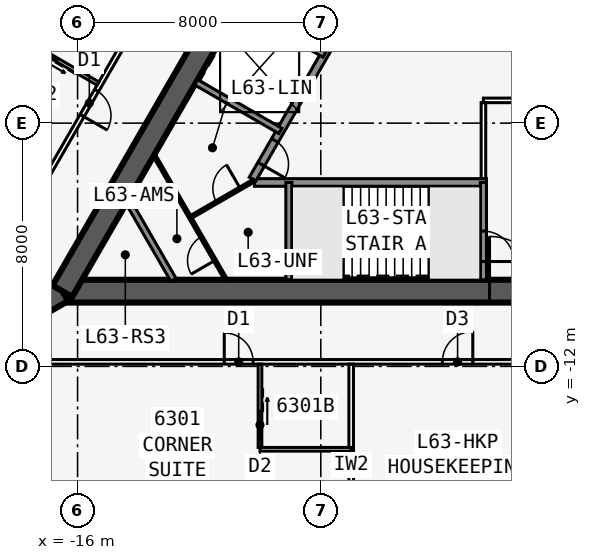
"""IFC4 building model, lengths in metres.
Left out: names, types, materials, properties, quantities, classifications, styles, units other than length and angle.
Written with IfcOpenShell. Run it as: python <this file> out.ifc"""

import sys

from ifc_helpers import new_model, si_unit, direction, frame, frame_2d, origin, place, context, subcontext, project, spatial, rectangle, extrude, element, fill, save


model = new_model("IFC4")
c1 = context("Model", 3, precision=1e-05, world=origin(), true_north=direction((0.0, 1.0)))
c2 = subcontext(c1, "Body", "Model", "MODEL_VIEW")
j1 = project(units=[si_unit("LENGTHUNIT", "METRE"), si_unit("PLANEANGLEUNIT", "RADIAN")], contexts=[c1])
p1 = place(None, origin())
s1 = spatial("IfcSite", under=j1, at=p1, CompositionType="ELEMENT")
p2 = place(p1, origin())
s2 = spatial("IfcBuilding", under=s1, at=p2, CompositionType="ELEMENT")
p3 = place(p2, frame((0.0, 0.0, 239.3)))
s3 = spatial("IfcBuildingStorey", under=s2, at=p3, CompositionType="ELEMENT", Elevation=239.3)
p4 = place(p3, frame((-16.5, -9.526, 0.0), z_axis=(0.0, 0.0, 1.0), x_axis=(1.0, 0.0, 0.0)))
e1 = element("IfcWall", 1, at=p4, inside=s3, PredefinedType="SHEAR", context=c2, shape_type="SweptSolid", body=[
    extrude(rectangle(XDim=33.0, YDim=0.75, at=frame_2d((16.5, 0.0))), origin(), (0.0, 0.0, 1.0), 3.6),
])
p5 = place(p4, frame((14.05, 0.0, 0.0)))
e2 = element("IfcOpeningElement", 2, at=p5, cuts=e1, PredefinedType="OPENING", context=c2, shape_type="SweptSolid", body=[
    extrude(rectangle(XDim=1.8, YDim=2.13, at=frame_2d((0.9, 1.065))), frame((0.0, 0.385, 0.0), z_axis=(0.0, -1.0, 0.0), x_axis=(1.0, 0.0, 0.0)), (0.0, 0.0, 1.0), 0.77),
])
p6 = place(p3, frame((-10.183, -5.951, 0.0), z_axis=(0.0, 0.0, 1.0), x_axis=(1.0, 0.0, 0.0)))
e3 = element("IfcWall", 3, at=p6, inside=s3, PredefinedType="SOLIDWALL", context=c2, shape_type="SweptSolid", body=[
    extrude(rectangle(XDim=7.633, YDim=0.25, at=frame_2d((3.816, 0.0))), origin(), (0.0, 0.0, 1.0), 3.435),
])
p7 = place(p3, frame((-9.05, -5.951, 0.0), z_axis=(0.0, 0.0, 1.0), x_axis=(0.0, -1.0, 0.0)))
e4 = element("IfcWall", 4, at=p7, inside=s3, PredefinedType="SOLIDWALL", context=c2, shape_type="SweptSolid", body=[
    extrude(rectangle(XDim=3.2, YDim=0.2, at=frame_2d((1.6, 0.0))), origin(), (0.0, 0.0, 1.0), 3.435),
])
p8 = place(p3, frame((-2.65, -5.951, 0.0), z_axis=(0.0, 0.0, 1.0), x_axis=(0.0, -1.0, 0.0)))
e5 = element("IfcWall", 5, at=p8, inside=s3, PredefinedType="SOLIDWALL", context=c2, shape_type="SweptSolid", body=[
    extrude(rectangle(XDim=3.2, YDim=0.2, at=frame_2d((1.6, 0.0))), origin(), (0.0, 0.0, 1.0), 3.435),
])
p9 = place(p8, frame((1.6, 0.0, 0.0)))
e6 = element("IfcOpeningElement", 6, at=p9, cuts=e5, PredefinedType="OPENING", context=c2, shape_type="SweptSolid", body=[
    extrude(rectangle(XDim=1.0, YDim=2.13, at=frame_2d((0.5, 1.065))), frame((0.0, 0.11, 0.0), z_axis=(0.0, -1.0, 0.0), x_axis=(1.0, 0.0, 0.0)), (0.0, 0.0, 1.0), 0.22),
])
p10 = place(p3, frame((0.0, 19.052, 0.0), z_axis=(0.0, 0.0, 1.0), x_axis=(-0.499999749417, -0.866025548458, 0.0)))
e7 = element("IfcWall", 7, at=p10, inside=s3, PredefinedType="SHEAR", context=c2, shape_type="SweptSolid", body=[
    extrude(rectangle(XDim=33.0, YDim=0.75, at=frame_2d((16.5, 0.0))), origin(), (0.0, 0.0, 1.0), 3.6),
])
p11 = place(p10, frame((14.15, 0.0, 0.0)))
e8 = element("IfcOpeningElement", 8, at=p11, cuts=e7, PredefinedType="OPENING", context=c2, shape_type="SweptSolid", body=[
    extrude(rectangle(XDim=1.8, YDim=2.13, at=frame_2d((0.9, 1.065))), frame((0.0, 0.385, 0.0), z_axis=(0.0, -1.0, 0.0), x_axis=(1.0, 0.0, 0.0)), (0.0, 0.0, 1.0), 0.77),
])
p12 = place(p10, frame((12.6, 0.0, 0.0)))
e9 = element("IfcOpeningElement", 9, at=p12, cuts=e7, PredefinedType="OPENING", context=c2, shape_type="SweptSolid", body=[
    extrude(rectangle(XDim=1.0, YDim=2.13, at=frame_2d((0.5, 1.065))), frame((0.0, 0.385, 0.0), z_axis=(0.0, -1.0, 0.0), x_axis=(1.0, 0.0, 0.0)), (0.0, 0.0, 1.0), 0.77),
])
p13 = place(p3, frame((-4.929, 3.365, 0.0), z_axis=(0.0, 0.0, 1.0), x_axis=(-0.499991433582, -0.866030349552, 0.0)))
e10 = element("IfcWall", 10, at=p13, inside=s3, PredefinedType="SOLIDWALL", context=c2, shape_type="SweptSolid", body=[
    extrude(rectangle(XDim=10.633, YDim=0.25, at=frame_2d((5.316, 0.0))), origin(), (0.0, 0.0, 1.0), 3.435),
])
p14 = place(p13, frame((9.164, 0.0, 0.0)))
e11 = element("IfcOpeningElement", 11, at=p14, cuts=e10, PredefinedType="OPENING", context=c2, shape_type="SweptSolid", body=[
    extrude(rectangle(XDim=0.9, YDim=2.13, at=frame_2d((0.45, 1.065))), frame((0.0, 0.135, 0.0), z_axis=(0.0, -1.0, 0.0), x_axis=(1.0, 0.0, 0.0)), (0.0, 0.0, 1.0), 0.27),
])
p15 = place(p13, frame((1.1, 0.0, 0.0)))
e12 = element("IfcOpeningElement", 12, at=p15, cuts=e10, PredefinedType="OPENING", context=c2, shape_type="SweptSolid", body=[
    extrude(rectangle(XDim=0.9, YDim=2.13, at=frame_2d((0.45, 1.065))), frame((0.0, 0.135, 0.0), z_axis=(0.0, -1.0, 0.0), x_axis=(1.0, 0.0, 0.0)), (0.0, 0.0, 1.0), 0.27),
])
p16 = place(p13, frame((4.0, 0.0, 0.0)))
e13 = element("IfcOpeningElement", 13, at=p16, cuts=e10, PredefinedType="OPENING", context=c2, shape_type="SweptSolid", body=[
    extrude(rectangle(XDim=0.9, YDim=2.13, at=frame_2d((0.45, 1.065))), frame((0.0, 0.135, 0.0), z_axis=(0.0, -1.0, 0.0), x_axis=(1.0, 0.0, 0.0)), (0.0, 0.0, 1.0), 0.27),
])
p17 = place(p3, frame((-7.879, -1.744, 0.0), z_axis=(0.0, 0.0, 1.0), x_axis=(-0.866042017984, 0.499971222258, 0.0)))
e14 = element("IfcWall", 14, at=p17, inside=s3, PredefinedType="SOLIDWALL", context=c2, shape_type="SweptSolid", body=[
    extrude(rectangle(XDim=3.2, YDim=0.2, at=frame_2d((1.6, 0.0))), origin(), (0.0, 0.0, 1.0), 3.435),
])
p18 = place(p3, frame((-9.329, -4.256, 0.0), z_axis=(0.0, 0.0, 1.0), x_axis=(-0.866022944154, 0.50000426018, 0.0)))
e15 = element("IfcWall", 15, at=p18, inside=s3, PredefinedType="SOLIDWALL", context=c2, shape_type="SweptSolid", body=[
    extrude(rectangle(XDim=3.2, YDim=0.2, at=frame_2d((1.6, 0.0))), origin(), (0.0, 0.0, 1.0), 3.435),
])
p19 = place(p3, frame((-16.5, -9.526, 0.0), z_axis=(0.0, 0.0, 1.0), x_axis=(-0.866031398331, -0.499989616998, 0.0)))
e16 = element("IfcWall", 16, at=p19, inside=s3, PredefinedType="SHEAR", context=c2, shape_type="SweptSolid", body=[
    extrude(rectangle(XDim=4.746, YDim=0.75, at=frame_2d((2.373, 0.0))), origin(), (0.0, 0.0, 1.0), 3.6),
])
p20 = place(p19, frame((1.725, 0.0, 0.0)))
e17 = element("IfcOpeningElement", 17, at=p20, cuts=e16, PredefinedType="OPENING", context=c2, shape_type="SweptSolid", body=[
    extrude(rectangle(XDim=1.8, YDim=2.13, at=frame_2d((0.9, 1.065))), frame((0.0, 0.385, 0.0), z_axis=(0.0, -1.0, 0.0), x_axis=(1.0, 0.0, 0.0)), (0.0, 0.0, 1.0), 0.77),
])
p21 = place(p3, frame((-18.561, -15.865, 0.0), z_axis=(0.0, 0.0, 1.0), x_axis=(0.965913862671, -0.258863689806, 0.0)))
e18 = element("IfcWall", 18, at=p21, inside=s3, PredefinedType="SOLIDWALL", context=c2, shape_type="SweptSolid", body=[
    extrude(rectangle(XDim=4.782, YDim=0.45, at=frame_2d((2.391, 0.0))), origin(), (0.0, 0.0, 1.0), 3.435),
])
p22 = place(p21, frame((0.591, 0.0, 0.45)))
e19 = element("IfcOpeningElement", 19, at=p22, cuts=e18, PredefinedType="OPENING", context=c2, shape_type="SweptSolid", body=[
    extrude(rectangle(XDim=3.6, YDim=2.6, at=frame_2d((1.8, 1.3))), frame((0.0, 0.235, 0.0), z_axis=(0.0, -1.0, 0.0), x_axis=(1.0, 0.0, 0.0)), (0.0, 0.0, 1.0), 0.47),
])
p23 = place(p3, frame((-19.677, -11.851, 0.0), z_axis=(0.0, 0.0, 1.0), x_axis=(1.0, 0.0, 0.0)))
e20 = element("IfcWall", 20, at=p23, inside=s3, PredefinedType="PARTITIONING", context=c2, shape_type="SweptSolid", body=[
    extrude(rectangle(XDim=39.354, YDim=0.15, at=frame_2d((19.677, 0.0))), origin(), (0.0, 0.0, 1.0), 3.435),
])
p24 = place(p23, frame((8.502, 0.0, 0.0)))
e21 = element("IfcOpeningElement", 21, at=p24, cuts=e20, PredefinedType="OPENING", context=c2, shape_type="SweptSolid", body=[
    extrude(rectangle(XDim=0.95, YDim=2.13, at=frame_2d((0.475, 1.065))), frame((0.0, 0.085, 0.0), z_axis=(0.0, -1.0, 0.0), x_axis=(1.0, 0.0, 0.0)), (0.0, 0.0, 1.0), 0.17),
])
p25 = place(p23, frame((15.677, 0.0, 0.0)))
e22 = element("IfcOpeningElement", 22, at=p25, cuts=e20, PredefinedType="OPENING", context=c2, shape_type="SweptSolid", body=[
    extrude(rectangle(XDim=1.0, YDim=2.13, at=frame_2d((0.5, 1.065))), frame((0.0, 0.085, 0.0), z_axis=(0.0, -1.0, 0.0), x_axis=(1.0, 0.0, 0.0)), (0.0, 0.0, 1.0), 0.17),
])
p26 = place(p23, frame((22.902, 0.0, 0.0)))
e23 = element("IfcOpeningElement", 23, at=p26, cuts=e20, PredefinedType="OPENING", context=c2, shape_type="SweptSolid", body=[
    extrude(rectangle(XDim=0.95, YDim=2.13, at=frame_2d((0.475, 1.065))), frame((0.0, 0.085, 0.0), z_axis=(0.0, -1.0, 0.0), x_axis=(1.0, 0.0, 0.0)), (0.0, 0.0, 1.0), 0.17),
])
p27 = place(p23, frame((29.902, 0.0, 0.0)))
e24 = element("IfcOpeningElement", 24, at=p27, cuts=e20, PredefinedType="OPENING", context=c2, shape_type="SweptSolid", body=[
    extrude(rectangle(XDim=0.95, YDim=2.13, at=frame_2d((0.475, 1.065))), frame((0.0, 0.085, 0.0), z_axis=(0.0, -1.0, 0.0), x_axis=(1.0, 0.0, 0.0)), (0.0, 0.0, 1.0), 0.17),
])
p28 = place(p3, frame((-7.0, -11.926, 0.0), z_axis=(0.0, 0.0, 1.0), x_axis=(0.0, -1.0, 0.0)))
e25 = element("IfcWall", 25, at=p28, inside=s3, PredefinedType="PARTITIONING", context=c2, shape_type="SweptSolid", body=[
    extrude(rectangle(XDim=6.609, YDim=0.15, at=frame_2d((3.304, 0.0))), origin(), (0.0, 0.0, 1.0), 2.678),
])
p29 = place(p3, frame((-10.0, -14.726, 0.0), z_axis=(0.0, 0.0, 1.0), x_axis=(1.0, 0.0, 0.0)))
e26 = element("IfcWall", 26, at=p29, inside=s3, PredefinedType="PLUMBINGWALL", context=c2, shape_type="SweptSolid", body=[
    extrude(rectangle(XDim=3.0, YDim=0.12, at=frame_2d((1.5, 0.0))), origin(), (0.0, 0.0, 1.0), 3.435),
])
p30 = place(p3, frame((-10.0, -11.926, 0.0), z_axis=(0.0, 0.0, 1.0), x_axis=(0.0, -1.0, 0.0)))
e27 = element("IfcWall", 27, at=p30, inside=s3, PredefinedType="PLUMBINGWALL", context=c2, shape_type="SweptSolid", body=[
    extrude(rectangle(XDim=2.74, YDim=0.12, at=frame_2d((1.37, 0.0))), origin(), (0.0, 0.0, 1.0), 3.435),
])
p31 = place(p30, frame((1.55, 0.0, 0.0)))
e28 = element("IfcOpeningElement", 28, at=p31, cuts=e27, PredefinedType="OPENING", context=c2, shape_type="SweptSolid", body=[
    extrude(rectangle(XDim=0.9, YDim=2.13, at=frame_2d((0.45, 1.065))), frame((0.0, 0.07, 0.0), z_axis=(0.0, -1.0, 0.0), x_axis=(1.0, 0.0, 0.0)), (0.0, 0.0, 1.0), 0.14),
])
p32 = place(p3, frame((-0.425, 22.966, 0.0), z_axis=(0.0, 0.0, 1.0), x_axis=(-0.500000265775, -0.866025250339, 0.0)))
e29 = element("IfcWall", 29, at=p32, inside=s3, PredefinedType="PARTITIONING", context=c2, shape_type="SweptSolid", body=[
    extrude(rectangle(XDim=39.354, YDim=0.15, at=frame_2d((19.677, 0.0))), origin(), (0.0, 0.0, 1.0), 3.435),
])
p33 = place(p32, frame((8.502, 0.0, 0.0)))
e30 = element("IfcOpeningElement", 30, at=p33, cuts=e29, PredefinedType="OPENING", context=c2, shape_type="SweptSolid", body=[
    extrude(rectangle(XDim=0.95, YDim=2.13, at=frame_2d((0.475, 1.065))), frame((0.0, 0.085, 0.0), z_axis=(0.0, -1.0, 0.0), x_axis=(1.0, 0.0, 0.0)), (0.0, 0.0, 1.0), 0.17),
])
p34 = place(p32, frame((15.902, 0.0, 0.0)))
e31 = element("IfcOpeningElement", 31, at=p34, cuts=e29, PredefinedType="OPENING", context=c2, shape_type="SweptSolid", body=[
    extrude(rectangle(XDim=0.95, YDim=2.13, at=frame_2d((0.475, 1.065))), frame((0.0, 0.085, 0.0), z_axis=(0.0, -1.0, 0.0), x_axis=(1.0, 0.0, 0.0)), (0.0, 0.0, 1.0), 0.17),
])
p35 = place(p32, frame((22.902, 0.0, 0.0)))
e32 = element("IfcOpeningElement", 32, at=p35, cuts=e29, PredefinedType="OPENING", context=c2, shape_type="SweptSolid", body=[
    extrude(rectangle(XDim=0.95, YDim=2.13, at=frame_2d((0.475, 1.065))), frame((0.0, 0.085, 0.0), z_axis=(0.0, -1.0, 0.0), x_axis=(1.0, 0.0, 0.0)), (0.0, 0.0, 1.0), 0.17),
])
p36 = place(p32, frame((29.902, 0.0, 0.0)))
e33 = element("IfcOpeningElement", 33, at=p36, cuts=e29, PredefinedType="OPENING", context=c2, shape_type="SweptSolid", body=[
    extrude(rectangle(XDim=0.95, YDim=2.13, at=frame_2d((0.475, 1.065))), frame((0.0, 0.085, 0.0), z_axis=(0.0, -1.0, 0.0), x_axis=(1.0, 0.0, 0.0)), (0.0, 0.0, 1.0), 0.17),
])
p37 = place(p3, frame((-15.329, -2.697, 0.0), z_axis=(0.0, 0.0, 1.0), x_axis=(-0.866035715982, 0.499982138324, 0.0)))
e34 = element("IfcWall", 34, at=p37, inside=s3, PredefinedType="PLUMBINGWALL", context=c2, shape_type="SweptSolid", body=[
    extrude(rectangle(XDim=2.74, YDim=0.12, at=frame_2d((1.37, 0.0))), origin(), (0.0, 0.0, 1.0), 3.435),
])
p38 = place(p37, frame((1.55, 0.0, 0.0)))
e35 = element("IfcOpeningElement", 35, at=p38, cuts=e34, PredefinedType="OPENING", context=c2, shape_type="SweptSolid", body=[
    extrude(rectangle(XDim=0.9, YDim=2.13, at=frame_2d((0.45, 1.065))), frame((0.0, 0.07, 0.0), z_axis=(0.0, -1.0, 0.0), x_axis=(1.0, 0.0, 0.0)), (0.0, 0.0, 1.0), 0.14),
])
p39 = place(p3, frame((-2.65, -3.251, 0.0), z_axis=(0.0, 0.0, 1.0), x_axis=(1.0, 0.0, 0.0)))
e36 = element("IfcWall", 36, at=p39, inside=s3, PredefinedType="PARTITIONING", context=c2, shape_type="SweptSolid", body=[
    extrude(rectangle(XDim=8.35, YDim=0.15, at=frame_2d((4.175, 0.0))), origin(), (0.0, 0.0, 1.0), 3.435),
])
p40 = place(p3, frame((-2.65, -5.826, 0.0), z_axis=(0.0, 0.0, 1.0), x_axis=(0.0, 1.0, 0.0)))
e37 = element("IfcWall", 37, at=p40, inside=s3, PredefinedType="PARTITIONING", context=c2, shape_type="SweptSolid", body=[
    extrude(rectangle(XDim=2.5, YDim=0.15, at=frame_2d((1.25, 0.0))), origin(), (0.0, 0.0, 1.0), 3.435),
])
p41 = place(p3, frame((-12.848, -9.151, 0.0), z_axis=(0.0, 0.0, 1.0), x_axis=(-0.499952404951, 0.866052881055, 0.0)))
e38 = element("IfcWall", 38, at=p41, inside=s3, PredefinedType="SOLIDWALL", context=c2, shape_type="SweptSolid", body=[
    extrude(rectangle(XDim=3.002, YDim=0.2, at=frame_2d((1.501, 0.0))), origin(), (0.0, 0.0, 1.0), 3.435),
])
p42 = place(p3, frame((-11.116, -9.151, 0.0), z_axis=(0.0, 0.0, 1.0), x_axis=(-0.499999210213, 0.866025859768, 0.0)))
e39 = element("IfcWall", 39, at=p42, inside=s3, PredefinedType="PARTITIONING", context=c2, shape_type="SweptSolid", body=[
    extrude(rectangle(XDim=4.734, YDim=0.1, at=frame_2d((2.367, 0.0))), origin(), (0.0, 0.0, 1.0), 3.435),
])
p43 = place(p42, frame((0.734, 0.0, 0.0)))
e40 = element("IfcOpeningElement", 40, at=p43, cuts=e39, PredefinedType="OPENING", context=c2, shape_type="SweptSolid", body=[
    extrude(rectangle(XDim=0.9, YDim=2.13, at=frame_2d((0.45, 1.065))), frame((0.0, 0.06, 0.0), z_axis=(0.0, -1.0, 0.0), x_axis=(1.0, 0.0, 0.0)), (0.0, 0.0, 1.0), 0.12),
])
p44 = place(p3, frame((-12.3, -7.101, 0.0), z_axis=(0.0, 0.0, 1.0), x_axis=(0.866022978719, 0.500004200313, 0.0)))
e41 = element("IfcWall", 41, at=p44, inside=s3, PredefinedType="PARTITIONING", context=c2, shape_type="SweptSolid", body=[
    extrude(rectangle(XDim=2.425, YDim=0.1, at=frame_2d((1.213, 0.0))), origin(), (0.0, 0.0, 1.0), 3.435),
])
p45 = place(p44, frame((1.005, 0.0, 0.0)))
e42 = element("IfcOpeningElement", 42, at=p45, cuts=e41, PredefinedType="OPENING", context=c2, shape_type="SweptSolid", body=[
    extrude(rectangle(XDim=0.9, YDim=2.13, at=frame_2d((0.45, 1.065))), frame((0.0, 0.06, 0.0), z_axis=(0.0, -1.0, 0.0), x_axis=(1.0, 0.0, 0.0)), (0.0, 0.0, 1.0), 0.12),
])
p46 = place(p3, frame((-7.247, -7.576, 0.0), z_axis=(0.0, 0.0, 1.0), x_axis=(1.0, 0.0, 0.0)))
e43 = element("IfcWall", 43, at=p46, inside=s3, PredefinedType="SOLIDWALL", context=c2, shape_type="SweptSolid", body=[
    extrude(rectangle(XDim=2.794, YDim=0.1, at=frame_2d((1.397, 0.0))), origin(), (0.0, 0.0, 1.0), 3.6),
])
p47 = place(p31, origin())
e44 = element("IfcDoor", 44, at=p47, inside=s3, OperationType="SLIDING_TO_LEFT", PredefinedType="DOOR", context=c2, shape_type="SweptSolid", body=[
    extrude(rectangle(XDim=0.9, YDim=2.13, at=frame_2d((0.45, 1.065))), frame((0.0, 0.025, 0.0), z_axis=(0.0, -1.0, 0.0), x_axis=(1.0, 0.0, 0.0)), (0.0, 0.0, 1.0), 0.05),
])
fill(e28, e44)
p48 = place(p24, origin())
e45 = element("IfcDoor", 45, at=p48, inside=s3, OperationType="SINGLE_SWING_LEFT", PredefinedType="DOOR", context=c2, shape_type="SweptSolid", body=[
    extrude(rectangle(XDim=0.95, YDim=2.13, at=frame_2d((0.475, 1.065))), frame((0.0, 0.025, 0.0), z_axis=(0.0, -1.0, 0.0), x_axis=(1.0, 0.0, 0.0)), (0.0, 0.0, 1.0), 0.05),
])
fill(e21, e45)
p49 = place(p25, origin())
e46 = element("IfcDoor", 46, at=p49, inside=s3, OperationType="SINGLE_SWING_RIGHT", PredefinedType="DOOR", context=c2, shape_type="SweptSolid", body=[
    extrude(rectangle(XDim=1.0, YDim=2.13, at=frame_2d((0.5, 1.065))), frame((0.0, 0.025, 0.0), z_axis=(0.0, -1.0, 0.0), x_axis=(1.0, 0.0, 0.0)), (0.0, 0.0, 1.0), 0.05),
])
fill(e22, e46)
p50 = place(p38, origin())
e47 = element("IfcDoor", 47, at=p50, inside=s3, OperationType="SLIDING_TO_LEFT", PredefinedType="DOOR", context=c2, shape_type="SweptSolid", body=[
    extrude(rectangle(XDim=0.9, YDim=2.13, at=frame_2d((0.45, 1.065))), frame((0.0, 0.025, 0.0), z_axis=(0.0, -1.0, 0.0), x_axis=(1.0, 0.0, 0.0)), (0.0, 0.0, 1.0), 0.05),
])
fill(e35, e47)
p51 = place(p36, origin())
e48 = element("IfcDoor", 48, at=p51, inside=s3, OperationType="SINGLE_SWING_RIGHT", PredefinedType="DOOR", context=c2, shape_type="SweptSolid", body=[
    extrude(rectangle(XDim=0.95, YDim=2.13, at=frame_2d((0.475, 1.065))), frame((0.0, 0.025, 0.0), z_axis=(0.0, -1.0, 0.0), x_axis=(1.0, 0.0, 0.0)), (0.0, 0.0, 1.0), 0.05),
])
fill(e33, e48)
p52 = place(p5, origin())
e49 = element("IfcDoor", 49, at=p52, inside=s3, OperationType="DOUBLE_DOOR_SINGLE_SWING", PredefinedType="DOOR", context=c2, shape_type="SweptSolid", body=[
    extrude(rectangle(XDim=1.8, YDim=2.13, at=frame_2d((0.9, 1.065))), frame((0.0, 0.025, 0.0), z_axis=(0.0, -1.0, 0.0), x_axis=(1.0, 0.0, 0.0)), (0.0, 0.0, 1.0), 0.05),
])
fill(e2, e49)
p53 = place(p9, origin())
e50 = element("IfcDoor", 50, at=p53, inside=s3, OperationType="SINGLE_SWING_RIGHT", PredefinedType="DOOR", context=c2, shape_type="SweptSolid", body=[
    extrude(rectangle(XDim=1.0, YDim=2.13, at=frame_2d((0.5, 1.065))), frame((0.0, 0.025, 0.0), z_axis=(0.0, -1.0, 0.0), x_axis=(1.0, 0.0, 0.0)), (0.0, 0.0, 1.0), 0.05),
])
fill(e6, e50)
p54 = place(p43, origin())
e51 = element("IfcDoor", 51, at=p54, inside=s3, OperationType="SINGLE_SWING_LEFT", PredefinedType="DOOR", context=c2, shape_type="SweptSolid", body=[
    extrude(rectangle(XDim=0.9, YDim=2.13, at=frame_2d((0.45, 1.065))), frame((0.0, 0.025, 0.0), z_axis=(0.0, -1.0, 0.0), x_axis=(1.0, 0.0, 0.0)), (0.0, 0.0, 1.0), 0.05),
])
fill(e40, e51)
p55 = place(p14, origin())
e52 = element("IfcDoor", 52, at=p55, inside=s3, OperationType="SINGLE_SWING_RIGHT", PredefinedType="DOOR", context=c2, shape_type="SweptSolid", body=[
    extrude(rectangle(XDim=0.9, YDim=2.13, at=frame_2d((0.45, 1.065))), frame((0.0, 0.025, 0.0), z_axis=(0.0, -1.0, 0.0), x_axis=(1.0, 0.0, 0.0)), (0.0, 0.0, 1.0), 0.05),
])
fill(e11, e52)
p56 = place(p45, origin())
e53 = element("IfcDoor", 53, at=p56, inside=s3, OperationType="SINGLE_SWING_RIGHT", PredefinedType="DOOR", context=c2, shape_type="SweptSolid", body=[
    extrude(rectangle(XDim=0.9, YDim=2.13, at=frame_2d((0.45, 1.065))), frame((0.0, 0.025, 0.0), z_axis=(0.0, -1.0, 0.0), x_axis=(1.0, 0.0, 0.0)), (0.0, 0.0, 1.0), 0.05),
])
fill(e42, e53)
save(model, sys.argv[1])
